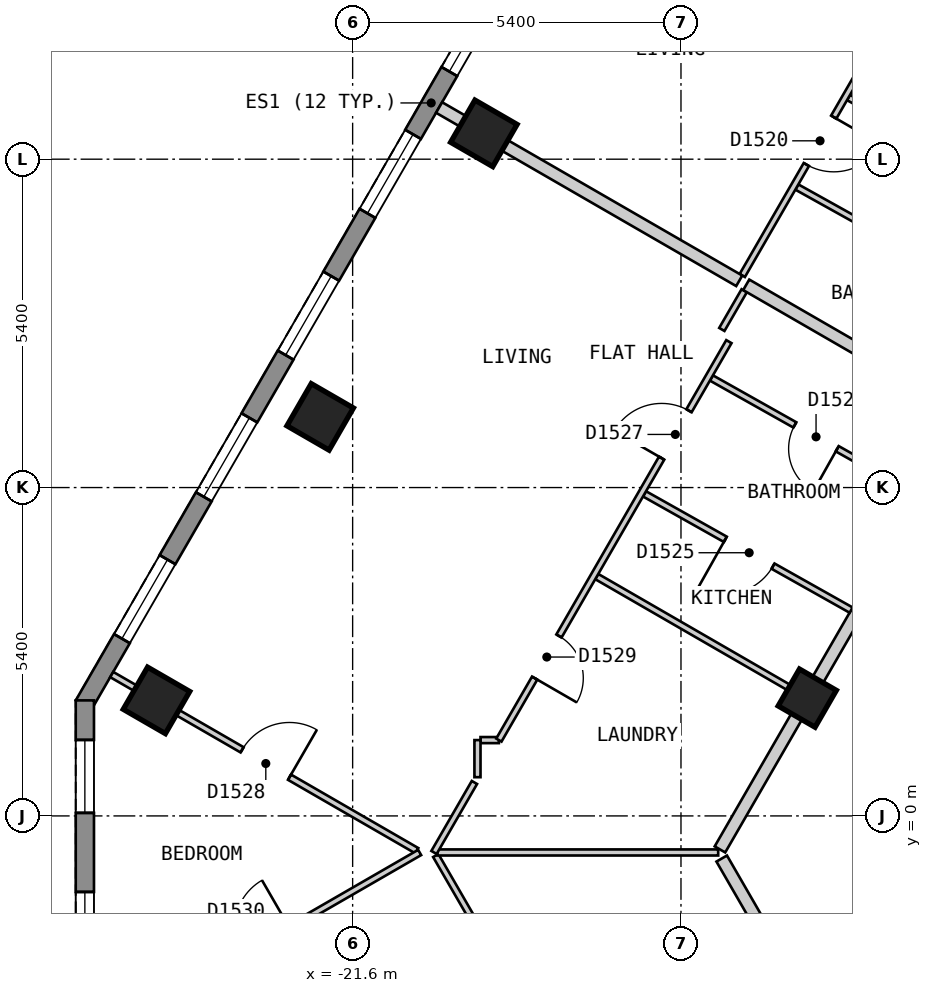
"""IFC4 building model, lengths in metres.
Left out: names, types, materials, properties, quantities, classifications, styles, units other than length and angle.
Written with IfcOpenShell. Run it as: python <this file> out.ifc"""

import sys

from ifc_helpers import new_model, si_unit, direction, frame, frame_2d, origin, origin_2d, place, context, subcontext, project, spatial, polyline, rectangle, outline, extrude, element, fill, save


model = new_model("IFC4")
c1 = context("Model", 3, precision=1e-05, world=origin(), true_north=direction((0.0, 1.0)))
c2 = subcontext(c1, "Body", "Model", "MODEL_VIEW")
j1 = project(units=[si_unit("LENGTHUNIT", "METRE"), si_unit("PLANEANGLEUNIT", "RADIAN")], contexts=[c1])
p1 = place(None, origin())
s1 = spatial("IfcSite", under=j1, at=p1, CompositionType="ELEMENT")
p2 = place(p1, origin())
s2 = spatial("IfcBuilding", under=s1, at=p2, CompositionType="ELEMENT")
p3 = place(p2, frame((0.0, 0.0, 196.2)))
s3 = spatial("IfcBuildingStorey", under=s2, at=p3, CompositionType="ELEMENT", Elevation=196.2)
for number, where, z_axis, x_axis in (
    (1, (-19.442, 11.225, 0.0), (0.0, 0.0, 1.0), (-0.5, -0.866, 0.0)),
    (2, (-22.134, 6.562, 0.0), (0.0, 0.0, 1.0), (-0.5, -0.866, 0.0)),
    (3, (-24.826, 1.9, 0.0), (0.0, 0.0, 1.0), (-0.5, -0.866, 0.0)),
):
    element("IfcColumn", number, at=place(p3, frame(where, z_axis=z_axis, x_axis=x_axis)), inside=s3, PredefinedType="COLUMN", context=c2, shape_type="SweptSolid", body=[
        extrude(rectangle(XDim=0.8, YDim=0.8, at=origin_2d()), origin(), (0.0, 0.0, 1.0), 3.0),
    ])
p4 = place(p3, frame((-14.123, 1.937, 0.0), z_axis=(0.0, 0.0, 1.0), x_axis=(-0.5, -0.866025403784, 0.0)))
e4 = element("IfcColumn", 4, at=p4, inside=s3, PredefinedType="COLUMN", context=c2, shape_type="SweptSolid", body=[
    extrude(rectangle(XDim=0.7, YDim=0.7, at=origin_2d()), origin(), (0.0, 0.0, 1.0), 3.0),
])
p5 = place(p3, frame((-14.592, 21.625, 0.0), z_axis=(0.0, 0.0, 1.0), x_axis=(-0.500010537973, -0.866019319597, 0.0)))
e5 = element("IfcWall", 5, at=p5, inside=s3, PredefinedType="SOLIDWALL", context=c2, shape_type="SweptSolid", body=[
    extrude(outline(polyline([(0.0, -0.15), (22.863, -0.15), (22.783, 0.15), (0.08, 0.15), (0.0, -0.15)])), origin(), (0.0, 0.0, 1.0), 2.6),
])
p6 = place(p5, frame((1.259, 0.0, 0.15)))
e6 = element("IfcOpeningElement", 6, at=p6, cuts=e5, PredefinedType="OPENING", context=c2, shape_type="SweptSolid", body=[
    extrude(rectangle(XDim=1.5, YDim=2.1, at=frame_2d((0.75, 1.05))), frame((0.0, 0.16, 0.0), z_axis=(0.0, -1.0, 0.0), x_axis=(1.0, 0.0, 0.0)), (0.0, 0.0, 1.0), 0.32),
])
p7 = place(p5, frame((3.952, 0.0, 0.15)))
e7 = element("IfcOpeningElement", 7, at=p7, cuts=e5, PredefinedType="OPENING", context=c2, shape_type="SweptSolid", body=[
    extrude(rectangle(XDim=1.5, YDim=2.1, at=frame_2d((0.75, 1.05))), frame((0.0, 0.16, 0.0), z_axis=(0.0, -1.0, 0.0), x_axis=(1.0, 0.0, 0.0)), (0.0, 0.0, 1.0), 0.32),
])
p8 = place(p5, frame((6.644, 0.0, 0.15)))
e8 = element("IfcOpeningElement", 8, at=p8, cuts=e5, PredefinedType="OPENING", context=c2, shape_type="SweptSolid", body=[
    extrude(rectangle(XDim=1.5, YDim=2.1, at=frame_2d((0.75, 1.05))), frame((0.0, 0.16, 0.0), z_axis=(0.0, -1.0, 0.0), x_axis=(1.0, 0.0, 0.0)), (0.0, 0.0, 1.0), 0.32),
])
p9 = place(p5, frame((9.335, 0.0, 0.15)))
e9 = element("IfcOpeningElement", 9, at=p9, cuts=e5, PredefinedType="OPENING", context=c2, shape_type="SweptSolid", body=[
    extrude(rectangle(XDim=1.5, YDim=2.1, at=frame_2d((0.75, 1.05))), frame((0.0, 0.16, 0.0), z_axis=(0.0, -1.0, 0.0), x_axis=(1.0, 0.0, 0.0)), (0.0, 0.0, 1.0), 0.32),
])
p10 = place(p5, frame((12.028, 0.0, 0.15)))
e10 = element("IfcOpeningElement", 10, at=p10, cuts=e5, PredefinedType="OPENING", context=c2, shape_type="SweptSolid", body=[
    extrude(rectangle(XDim=1.5, YDim=2.1, at=frame_2d((0.75, 1.05))), frame((0.0, 0.16, 0.0), z_axis=(0.0, -1.0, 0.0), x_axis=(1.0, 0.0, 0.0)), (0.0, 0.0, 1.0), 0.32),
])
p11 = place(p5, frame((14.72, 0.0, 0.15)))
e11 = element("IfcOpeningElement", 11, at=p11, cuts=e5, PredefinedType="OPENING", context=c2, shape_type="SweptSolid", body=[
    extrude(rectangle(XDim=1.5, YDim=2.1, at=frame_2d((0.75, 1.05))), frame((0.0, 0.16, 0.0), z_axis=(0.0, -1.0, 0.0), x_axis=(1.0, 0.0, 0.0)), (0.0, 0.0, 1.0), 0.32),
])
p12 = place(p5, frame((17.411, 0.0, 0.15)))
e12 = element("IfcOpeningElement", 12, at=p12, cuts=e5, PredefinedType="OPENING", context=c2, shape_type="SweptSolid", body=[
    extrude(rectangle(XDim=1.5, YDim=2.1, at=frame_2d((0.75, 1.05))), frame((0.0, 0.16, 0.0), z_axis=(0.0, -1.0, 0.0), x_axis=(1.0, 0.0, 0.0)), (0.0, 0.0, 1.0), 0.32),
])
p13 = place(p5, frame((20.104, 0.0, 0.15)))
e13 = element("IfcOpeningElement", 13, at=p13, cuts=e5, PredefinedType="OPENING", context=c2, shape_type="SweptSolid", body=[
    extrude(rectangle(XDim=1.5, YDim=2.1, at=frame_2d((0.75, 1.05))), frame((0.0, 0.16, 0.0), z_axis=(0.0, -1.0, 0.0), x_axis=(1.0, 0.0, 0.0)), (0.0, 0.0, 1.0), 0.32),
])
p14 = place(p3, frame((-26.004, 1.9, 0.0), z_axis=(0.0, 0.0, 1.0), x_axis=(0.0, -1.0, 0.0)))
e14 = element("IfcWall", 14, at=p14, inside=s3, PredefinedType="SOLIDWALL", context=c2, shape_type="SweptSolid", body=[
    extrude(outline(polyline([(0.0, -0.15), (5.0, -0.15), (4.92, 0.15), (0.08, 0.15), (0.0, -0.15)])), origin(), (0.0, 0.0, 1.0), 2.6),
])
p15 = place(p14, frame((0.65, 0.0, 0.15)))
e15 = element("IfcOpeningElement", 15, at=p15, cuts=e14, PredefinedType="OPENING", context=c2, shape_type="SweptSolid", body=[
    extrude(rectangle(XDim=1.2, YDim=2.1, at=frame_2d((0.6, 1.05))), frame((0.0, 0.16, 0.0), z_axis=(0.0, -1.0, 0.0), x_axis=(1.0, 0.0, 0.0)), (0.0, 0.0, 1.0), 0.32),
])
p16 = place(p14, frame((3.15, 0.0, 0.15)))
e16 = element("IfcOpeningElement", 16, at=p16, cuts=e14, PredefinedType="OPENING", context=c2, shape_type="SweptSolid", body=[
    extrude(rectangle(XDim=1.2, YDim=2.1, at=frame_2d((0.6, 1.05))), frame((0.0, 0.16, 0.0), z_axis=(0.0, -1.0, 0.0), x_axis=(1.0, 0.0, 0.0)), (0.0, 0.0, 1.0), 0.32),
])
p17 = place(p3, frame((-15.53, -0.701, 0.0), z_axis=(0.0, 0.0, 1.0), x_axis=(0.499972710878, -0.866041158593, 0.0)))
e17 = element("IfcWall", 17, at=p17, inside=s3, PredefinedType="PARTITIONING", context=c2, shape_type="SweptSolid", body=[
    extrude(rectangle(XDim=2.308, YDim=0.2, at=frame_2d((1.154, 0.0))), origin(), (0.0, 0.0, 1.0), 2.6),
])
p18 = place(p3, frame((-15.559, -0.551, 0.0), z_axis=(0.0, 0.0, 1.0), x_axis=(0.499964997208, 0.866045611713, 0.0)))
e18 = element("IfcWall", 18, at=p18, inside=s3, PredefinedType="PARTITIONING", context=c2, shape_type="SweptSolid", body=[
    extrude(rectangle(XDim=9.643, YDim=0.2, at=frame_2d((4.821, 0.0))), origin(), (0.0, 0.0, 1.0), 2.6),
])
p19 = place(p18, frame((5.088, 0.0, 0.0)))
e19 = element("IfcOpeningElement", 19, at=p19, cuts=e18, PredefinedType="OPENING", context=c2, shape_type="SweptSolid", body=[
    extrude(rectangle(XDim=1.0, YDim=2.1, at=frame_2d((0.5, 1.05))), frame((0.0, 0.11, 0.0), z_axis=(0.0, -1.0, 0.0), x_axis=(1.0, 0.0, 0.0)), (0.0, 0.0, 1.0), 0.22),
])
p20 = place(p3, frame((-20.233, -0.651, 0.0), z_axis=(0.0, 0.0, 1.0), x_axis=(0.500498449207, -0.865737432679, 0.0)))
e20 = element("IfcWall", 20, at=p20, inside=s3, PredefinedType="PARTITIONING", context=c2, shape_type="SweptSolid", body=[
    extrude(rectangle(XDim=1.271, YDim=0.1, at=frame_2d((0.635, 0.0))), origin(), (0.0, 0.0, 1.0), 2.6),
])
p21 = place(p3, frame((-13.444, 11.814, 0.0), z_axis=(0.0, 0.0, 1.0), x_axis=(0.873653620945, -0.486548405207, 0.0)))
e21 = element("IfcWall", 21, at=p21, inside=s3, PredefinedType="PARTITIONING", context=c2, shape_type="SweptSolid", body=[
    extrude(rectangle(XDim=4.051, YDim=0.1, at=frame_2d((2.025, 0.0))), origin(), (0.0, 0.0, 1.0), 2.6),
])
p22 = place(p21, frame((1.6, 0.0, 0.0)))
e22 = element("IfcOpeningElement", 22, at=p22, cuts=e21, PredefinedType="OPENING", context=c2, shape_type="SweptSolid", body=[
    extrude(rectangle(XDim=0.9, YDim=2.1, at=frame_2d((0.45, 1.05))), frame((0.0, 0.06, 0.0), z_axis=(0.0, -1.0, 0.0), x_axis=(1.0, 0.0, 0.0)), (0.0, 0.0, 1.0), 0.12),
])
p23 = place(p3, frame((-14.294, 10.342, 0.0), z_axis=(0.0, 0.0, 1.0), x_axis=(0.873582256032, -0.486676527013, 0.0)))
e23 = element("IfcWall", 23, at=p23, inside=s3, PredefinedType="PARTITIONING", context=c2, shape_type="SweptSolid", body=[
    extrude(rectangle(XDim=4.05, YDim=0.1, at=frame_2d((2.025, 0.0))), origin(), (0.0, 0.0, 1.0), 2.6),
])
p24 = place(p23, frame((1.65, 0.0, 0.0)))
e24 = element("IfcOpeningElement", 24, at=p24, cuts=e23, PredefinedType="OPENING", context=c2, shape_type="SweptSolid", body=[
    extrude(rectangle(XDim=0.8, YDim=2.1, at=frame_2d((0.4, 1.05))), frame((0.0, 0.06, 0.0), z_axis=(0.0, -1.0, 0.0), x_axis=(1.0, 0.0, 0.0)), (0.0, 0.0, 1.0), 0.12),
])
p25 = place(p3, frame((-16.799, 5.296, 0.0), z_axis=(0.0, 0.0, 1.0), x_axis=(0.871565499758, -0.490279083413, 0.0)))
e25 = element("IfcWall", 25, at=p25, inside=s3, PredefinedType="PARTITIONING", context=c2, shape_type="SweptSolid", body=[
    extrude(rectangle(XDim=3.897, YDim=0.1, at=frame_2d((1.949, 0.0))), origin(), (0.0, 0.0, 1.0), 2.6),
])
p26 = place(p25, frame((1.524, 0.0, 0.0)))
e26 = element("IfcOpeningElement", 26, at=p26, cuts=e25, PredefinedType="OPENING", context=c2, shape_type="SweptSolid", body=[
    extrude(rectangle(XDim=0.9, YDim=2.1, at=frame_2d((0.45, 1.05))), frame((0.0, 0.06, 0.0), z_axis=(0.0, -1.0, 0.0), x_axis=(1.0, 0.0, 0.0)), (0.0, 0.0, 1.0), 0.12),
])
p27 = place(p3, frame((-15.699, 7.202, 0.0), z_axis=(0.0, 0.0, 1.0), x_axis=(0.871565499758, -0.490279083413, 0.0)))
e27 = element("IfcWall", 27, at=p27, inside=s3, PredefinedType="PARTITIONING", context=c2, shape_type="SweptSolid", body=[
    extrude(rectangle(XDim=3.897, YDim=0.1, at=frame_2d((1.949, 0.0))), origin(), (0.0, 0.0, 1.0), 2.6),
])
p28 = place(p27, frame((1.574, 0.0, 0.0)))
e28 = element("IfcOpeningElement", 28, at=p28, cuts=e27, PredefinedType="OPENING", context=c2, shape_type="SweptSolid", body=[
    extrude(rectangle(XDim=0.8, YDim=2.1, at=frame_2d((0.4, 1.05))), frame((0.0, 0.06, 0.0), z_axis=(0.0, -1.0, 0.0), x_axis=(1.0, 0.0, 0.0)), (0.0, 0.0, 1.0), 0.12),
])
p29 = place(p3, frame((-17.585, 3.936, 0.0), z_axis=(0.0, 0.0, 1.0), x_axis=(0.865979019114, -0.500080332001, 0.0)))
e29 = element("IfcWall", 29, at=p29, inside=s3, PredefinedType="PARTITIONING", context=c2, shape_type="SweptSolid", body=[
    extrude(rectangle(XDim=3.897, YDim=0.1, at=frame_2d((1.949, 0.0))), origin(), (0.0, 0.0, 1.0), 2.6),
])
p30 = place(p3, frame((-25.562, 2.325, 0.0), z_axis=(0.0, 0.0, 1.0), x_axis=(0.86599890761, -0.500045889912, 0.0)))
e30 = element("IfcWall", 30, at=p30, inside=s3, PredefinedType="PARTITIONING", context=c2, shape_type="SweptSolid", body=[
    extrude(rectangle(XDim=5.793, YDim=0.1, at=frame_2d((2.897, 0.0))), origin(), (0.0, 0.0, 1.0), 2.6),
])
p31 = place(p30, frame((2.476, 0.0, 0.0)))
e31 = element("IfcOpeningElement", 31, at=p31, cuts=e30, PredefinedType="OPENING", context=c2, shape_type="SweptSolid", body=[
    extrude(rectangle(XDim=0.9, YDim=2.1, at=frame_2d((0.45, 1.05))), frame((0.0, 0.06, 0.0), z_axis=(0.0, -1.0, 0.0), x_axis=(1.0, 0.0, 0.0)), (0.0, 0.0, 1.0), 0.12),
])
p32 = place(p3, frame((-20.204, -0.601, 0.0), z_axis=(0.0, 0.0, 1.0), x_axis=(1.0, 0.0, 0.0)))
e32 = element("IfcWall", 32, at=p32, inside=s3, PredefinedType="PARTITIONING", context=c2, shape_type="SweptSolid", body=[
    extrude(rectangle(XDim=4.616, YDim=0.1, at=frame_2d((2.308, 0.0))), origin(), (0.0, 0.0, 1.0), 2.6),
])
p33 = place(p3, frame((-19.497, 1.247, 0.0), z_axis=(0.0, 0.0, 1.0), x_axis=(1.0, 0.0, 0.0)))
e33 = element("IfcWall", 33, at=p33, inside=s3, PredefinedType="PARTITIONING", context=c2, shape_type="SweptSolid", body=[
    extrude(rectangle(XDim=0.302, YDim=0.1, at=frame_2d((0.151, 0.0))), origin(), (0.0, 0.0, 1.0), 2.6),
])
p34 = place(p3, frame((-20.262, -0.601, 0.0), z_axis=(0.0, 0.0, 1.0), x_axis=(0.500247001515, 0.86588275042, 0.0)))
e34 = element("IfcWall", 34, at=p34, inside=s3, PredefinedType="PARTITIONING", context=c2, shape_type="SweptSolid", body=[
    extrude(rectangle(XDim=1.329, YDim=0.1, at=frame_2d((0.665, 0.0))), origin(), (0.0, 0.0, 1.0), 2.6),
])
p35 = place(p3, frame((-19.195, 1.247, 0.0), z_axis=(0.0, 0.0, 1.0), x_axis=(0.499959862915, 0.866048575701, 0.0)))
e35 = element("IfcWall", 35, at=p35, inside=s3, PredefinedType="PARTITIONING", context=c2, shape_type="SweptSolid", body=[
    extrude(rectangle(XDim=7.566, YDim=0.1, at=frame_2d((3.783, 0.0))), origin(), (0.0, 0.0, 1.0), 2.6),
])
p36 = place(p35, frame((5.354, 0.0, 0.0)))
e36 = element("IfcOpeningElement", 36, at=p36, cuts=e35, PredefinedType="OPENING", context=c2, shape_type="SweptSolid", body=[
    extrude(rectangle(XDim=0.9, YDim=2.1, at=frame_2d((0.45, 1.05))), frame((0.0, 0.06, 0.0), z_axis=(0.0, -1.0, 0.0), x_axis=(1.0, 0.0, 0.0)), (0.0, 0.0, 1.0), 0.12),
])
p37 = place(p35, frame((1.177, 0.0, 0.0)))
e37 = element("IfcOpeningElement", 37, at=p37, cuts=e35, PredefinedType="OPENING", context=c2, shape_type="SweptSolid", body=[
    extrude(rectangle(XDim=0.8, YDim=2.1, at=frame_2d((0.4, 1.05))), frame((0.0, 0.06, 0.0), z_axis=(0.0, -1.0, 0.0), x_axis=(1.0, 0.0, 0.0)), (0.0, 0.0, 1.0), 0.12),
])
p38 = place(p3, frame((-15.528, 8.0, 0.0), z_axis=(0.0, 0.0, 1.0), x_axis=(0.500421336976, 0.865782008071, 0.0)))
e38 = element("IfcWall", 38, at=p38, inside=s3, PredefinedType="PARTITIONING", context=c2, shape_type="SweptSolid", body=[
    extrude(rectangle(XDim=0.736, YDim=0.1, at=frame_2d((0.368, 0.0))), origin(), (0.0, 0.0, 1.0), 2.6),
])
p39 = place(p3, frame((-15.192, 8.887, 0.0), z_axis=(0.0, 0.0, 1.0), x_axis=(0.500028204665, 0.866009119201, 0.0)))
e39 = element("IfcWall", 39, at=p39, inside=s3, PredefinedType="PARTITIONING", context=c2, shape_type="SweptSolid", body=[
    extrude(rectangle(XDim=10.667, YDim=0.1, at=frame_2d((5.334, 0.0))), origin(), (0.0, 0.0, 1.0), 2.6),
])
p40 = place(p39, frame((2.108, 0.0, 0.0)))
e40 = element("IfcOpeningElement", 40, at=p40, cuts=e39, PredefinedType="OPENING", context=c2, shape_type="SweptSolid", body=[
    extrude(rectangle(XDim=0.9, YDim=2.1, at=frame_2d((0.45, 1.05))), frame((0.0, 0.06, 0.0), z_axis=(0.0, -1.0, 0.0), x_axis=(1.0, 0.0, 0.0)), (0.0, 0.0, 1.0), 0.12),
])
p41 = place(p39, frame((7.576, 0.0, 0.0)))
e41 = element("IfcOpeningElement", 41, at=p41, cuts=e39, PredefinedType="OPENING", context=c2, shape_type="SweptSolid", body=[
    extrude(rectangle(XDim=0.8, YDim=2.1, at=frame_2d((0.4, 1.05))), frame((0.0, 0.06, 0.0), z_axis=(0.0, -1.0, 0.0), x_axis=(1.0, 0.0, 0.0)), (0.0, 0.0, 1.0), 0.12),
])
p42 = place(p3, frame((-19.547, 0.637, 0.0), z_axis=(0.0, 0.0, 1.0), x_axis=(0.0, 1.0, 0.0)))
e42 = element("IfcWall", 42, at=p42, inside=s3, PredefinedType="PARTITIONING", context=c2, shape_type="SweptSolid", body=[
    extrude(rectangle(XDim=0.61, YDim=0.1, at=frame_2d((0.305, 0.0))), origin(), (0.0, 0.0, 1.0), 2.6),
])
p43 = place(p3, frame((-25.563, -3.524, 0.0), z_axis=(0.0, 0.0, 1.0), x_axis=(0.866128586522, 0.499821239653, 0.0)))
e43 = element("IfcWall", 43, at=p43, inside=s3, PredefinedType="PARTITIONING", context=c2, shape_type="SweptSolid", body=[
    extrude(rectangle(XDim=5.848, YDim=0.1, at=frame_2d((2.924, 0.0))), origin(), (0.0, 0.0, 1.0), 2.6),
])
p44 = place(p43, frame((2.474, 0.0, 0.0)))
e44 = element("IfcOpeningElement", 44, at=p44, cuts=e43, PredefinedType="OPENING", context=c2, shape_type="SweptSolid", body=[
    extrude(rectangle(XDim=0.9, YDim=2.1, at=frame_2d((0.45, 1.05))), frame((0.0, 0.06, 0.0), z_axis=(0.0, -1.0, 0.0), x_axis=(1.0, 0.0, 0.0)), (0.0, 0.0, 1.0), 0.12),
])
p45 = place(p3, frame((-20.178, 11.65, 0.0), z_axis=(0.0, 0.0, 1.0), x_axis=(0.866022950691, -0.500004248858, 0.0)))
e45 = element("IfcWall", 45, at=p45, inside=s3, PredefinedType="PARTITIONING", context=c2, shape_type="SweptSolid", body=[
    extrude(rectangle(XDim=5.7, YDim=0.2, at=frame_2d((2.85, 0.0))), origin(), (0.0, 0.0, 1.0), 2.6),
])
p46 = place(p3, frame((-15.127, 8.734, 0.0), z_axis=(0.0, 0.0, 1.0), x_axis=(0.865984601828, -0.500070664403, 0.0)))
e46 = element("IfcWall", 46, at=p46, inside=s3, PredefinedType="PARTITIONING", context=c2, shape_type="SweptSolid", body=[
    extrude(rectangle(XDim=4.167, YDim=0.2, at=frame_2d((2.084, 0.0))), origin(), (0.0, 0.0, 1.0), 2.6),
])
p47 = place(p9, origin())
e47 = element("IfcWindow", 47, at=p47, inside=s3, PartitioningType="SINGLE_PANEL", PredefinedType="WINDOW", context=c2, shape_type="SweptSolid", body=[
    extrude(rectangle(XDim=1.5, YDim=2.1, at=frame_2d((0.75, 1.05))), frame((0.0, 0.03, 0.0), z_axis=(0.0, -1.0, 0.0), x_axis=(1.0, 0.0, 0.0)), (0.0, 0.0, 1.0), 0.06),
])
fill(e9, e47)
p48 = place(p10, origin())
e48 = element("IfcWindow", 48, at=p48, inside=s3, PartitioningType="SINGLE_PANEL", PredefinedType="WINDOW", context=c2, shape_type="SweptSolid", body=[
    extrude(rectangle(XDim=1.5, YDim=2.1, at=frame_2d((0.75, 1.05))), frame((0.0, 0.03, 0.0), z_axis=(0.0, -1.0, 0.0), x_axis=(1.0, 0.0, 0.0)), (0.0, 0.0, 1.0), 0.06),
])
fill(e10, e48)
p49 = place(p11, origin())
e49 = element("IfcWindow", 49, at=p49, inside=s3, PartitioningType="SINGLE_PANEL", PredefinedType="WINDOW", context=c2, shape_type="SweptSolid", body=[
    extrude(rectangle(XDim=1.5, YDim=2.1, at=frame_2d((0.75, 1.05))), frame((0.0, 0.03, 0.0), z_axis=(0.0, -1.0, 0.0), x_axis=(1.0, 0.0, 0.0)), (0.0, 0.0, 1.0), 0.06),
])
fill(e11, e49)
p50 = place(p12, origin())
e50 = element("IfcWindow", 50, at=p50, inside=s3, PartitioningType="SINGLE_PANEL", PredefinedType="WINDOW", context=c2, shape_type="SweptSolid", body=[
    extrude(rectangle(XDim=1.5, YDim=2.1, at=frame_2d((0.75, 1.05))), frame((0.0, 0.03, 0.0), z_axis=(0.0, -1.0, 0.0), x_axis=(1.0, 0.0, 0.0)), (0.0, 0.0, 1.0), 0.06),
])
fill(e12, e50)
p51 = place(p13, origin())
e51 = element("IfcWindow", 51, at=p51, inside=s3, PartitioningType="SINGLE_PANEL", PredefinedType="WINDOW", context=c2, shape_type="SweptSolid", body=[
    extrude(rectangle(XDim=1.5, YDim=2.1, at=frame_2d((0.75, 1.05))), frame((0.0, 0.03, 0.0), z_axis=(0.0, -1.0, 0.0), x_axis=(1.0, 0.0, 0.0)), (0.0, 0.0, 1.0), 0.06),
])
fill(e13, e51)
p52 = place(p15, origin())
e52 = element("IfcWindow", 52, at=p52, inside=s3, PartitioningType="SINGLE_PANEL", PredefinedType="WINDOW", context=c2, shape_type="SweptSolid", body=[
    extrude(rectangle(XDim=1.2, YDim=2.1, at=frame_2d((0.6, 1.05))), frame((0.0, 0.03, 0.0), z_axis=(0.0, -1.0, 0.0), x_axis=(1.0, 0.0, 0.0)), (0.0, 0.0, 1.0), 0.06),
])
fill(e15, e52)
p53 = place(p16, origin())
e53 = element("IfcWindow", 53, at=p53, inside=s3, PartitioningType="SINGLE_PANEL", PredefinedType="WINDOW", context=c2, shape_type="SweptSolid", body=[
    extrude(rectangle(XDim=1.2, YDim=2.1, at=frame_2d((0.6, 1.05))), frame((0.0, 0.03, 0.0), z_axis=(0.0, -1.0, 0.0), x_axis=(1.0, 0.0, 0.0)), (0.0, 0.0, 1.0), 0.06),
])
fill(e16, e53)
p54 = place(p40, origin())
e54 = element("IfcDoor", 54, at=p54, inside=s3, OperationType="SINGLE_SWING_RIGHT", PredefinedType="DOOR", context=c2, shape_type="SweptSolid", body=[
    extrude(rectangle(XDim=0.9, YDim=2.1, at=frame_2d((0.45, 1.05))), frame((0.0, 0.025, 0.0), z_axis=(0.0, -1.0, 0.0), x_axis=(1.0, 0.0, 0.0)), (0.0, 0.0, 1.0), 0.05),
])
fill(e40, e54)
p55 = place(p26, origin())
e55 = element("IfcDoor", 55, at=p55, inside=s3, OperationType="SINGLE_SWING_LEFT", PredefinedType="DOOR", context=c2, shape_type="SweptSolid", body=[
    extrude(rectangle(XDim=0.9, YDim=2.1, at=frame_2d((0.45, 1.05))), frame((0.0, 0.025, 0.0), z_axis=(0.0, -1.0, 0.0), x_axis=(1.0, 0.0, 0.0)), (0.0, 0.0, 1.0), 0.05),
])
fill(e26, e55)
p56 = place(p28, origin())
e56 = element("IfcDoor", 56, at=p56, inside=s3, OperationType="SINGLE_SWING_RIGHT", PredefinedType="DOOR", context=c2, shape_type="SweptSolid", body=[
    extrude(rectangle(XDim=0.8, YDim=2.1, at=frame_2d((0.4, 1.05))), frame((0.0, 0.025, 0.0), z_axis=(0.0, -1.0, 0.0), x_axis=(1.0, 0.0, 0.0)), (0.0, 0.0, 1.0), 0.05),
])
fill(e28, e56)
p57 = place(p36, origin())
e57 = element("IfcDoor", 57, at=p57, inside=s3, OperationType="SINGLE_SWING_LEFT", PredefinedType="DOOR", context=c2, shape_type="SweptSolid", body=[
    extrude(rectangle(XDim=0.9, YDim=2.1, at=frame_2d((0.45, 1.05))), frame((0.0, 0.025, 0.0), z_axis=(0.0, -1.0, 0.0), x_axis=(1.0, 0.0, 0.0)), (0.0, 0.0, 1.0), 0.05),
])
fill(e36, e57)
p58 = place(p31, origin())
e58 = element("IfcDoor", 58, at=p58, inside=s3, OperationType="SINGLE_SWING_RIGHT", PredefinedType="DOOR", context=c2, shape_type="SweptSolid", body=[
    extrude(rectangle(XDim=0.9, YDim=2.1, at=frame_2d((0.45, 1.05))), frame((0.0, 0.025, 0.0), z_axis=(0.0, -1.0, 0.0), x_axis=(1.0, 0.0, 0.0)), (0.0, 0.0, 1.0), 0.05),
])
fill(e31, e58)
p59 = place(p37, origin())
e59 = element("IfcDoor", 59, at=p59, inside=s3, OperationType="SINGLE_SWING_LEFT", PredefinedType="DOOR", context=c2, shape_type="SweptSolid", body=[
    extrude(rectangle(XDim=0.8, YDim=2.1, at=frame_2d((0.4, 1.05))), frame((0.0, 0.025, 0.0), z_axis=(0.0, -1.0, 0.0), x_axis=(1.0, 0.0, 0.0)), (0.0, 0.0, 1.0), 0.05),
])
fill(e37, e59)
save(model, sys.argv[1])
